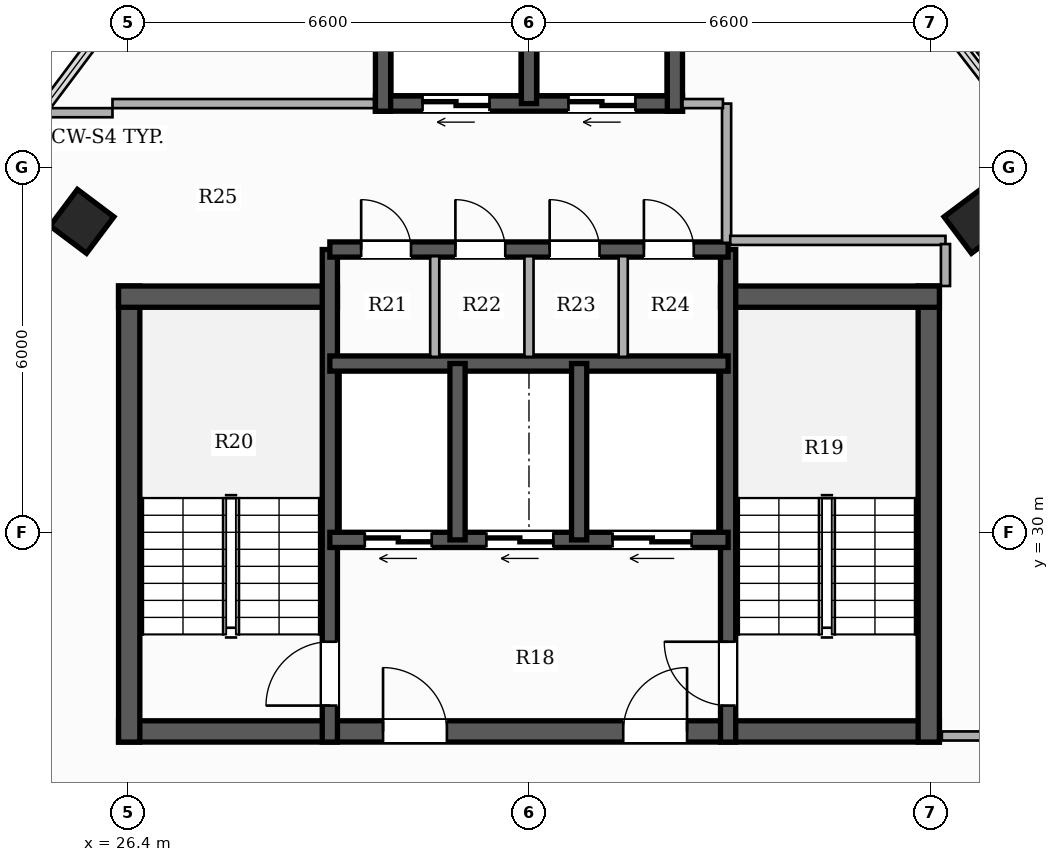
"""IFC4 building model, lengths in metres.
Left out: names, types, materials, properties, quantities, classifications, styles, units other than length and angle.
Written with IfcOpenShell. Run it as: python <this file> out.ifc"""

import sys

from ifc_helpers import new_model, si_unit, direction, frame, frame_2d, origin, origin_2d, place, context, subcontext, project, spatial, rectangle, hollow_rectangle, extrude, element, fill, save


model = new_model("IFC4")
c1 = context("Model", 3, precision=1e-05, world=origin(), true_north=direction((0.0, 1.0)))
c2 = subcontext(c1, "Body", "Model", "MODEL_VIEW")
j1 = project(units=[si_unit("LENGTHUNIT", "METRE"), si_unit("PLANEANGLEUNIT", "RADIAN")], contexts=[c1])
p1 = place(None, origin())
s1 = spatial("IfcSite", under=j1, at=p1, CompositionType="ELEMENT")
p2 = place(p1, origin())
s2 = spatial("IfcBuilding", under=s1, at=p2, CompositionType="ELEMENT")
p3 = place(p2, frame((0.0, 0.0, 243.65)))
s3 = spatial("IfcBuildingStorey", under=s2, at=p3, CompositionType="ELEMENT", Elevation=243.65)
p4 = place(p3, frame((26.25, 26.725, 0.0), z_axis=(0.0, 0.0, 1.0), x_axis=(1.0, 0.0, 0.0)))
e1 = element("IfcWall", 1, at=p4, inside=s3, PredefinedType="SHEAR", context=c2, shape_type="SweptSolid", body=[
    extrude(rectangle(XDim=13.5, YDim=0.35, at=frame_2d((6.75, 0.0))), origin(), (0.0, 0.0, 1.0), 3.3),
])
p5 = place(p4, frame((4.35, 0.0, 0.0)))
e2 = element("IfcOpeningElement", 2, at=p5, cuts=e1, PredefinedType="OPENING", context=c2, shape_type="SweptSolid", body=[
    extrude(rectangle(XDim=1.05, YDim=2.15, at=frame_2d((0.525, 1.075))), frame((0.0, 0.185, 0.0), z_axis=(0.0, -1.0, 0.0), x_axis=(1.0, 0.0, 0.0)), (0.0, 0.0, 1.0), 0.37),
])
p6 = place(p4, frame((8.3, 0.0, 0.0)))
e3 = element("IfcOpeningElement", 3, at=p6, cuts=e1, PredefinedType="OPENING", context=c2, shape_type="SweptSolid", body=[
    extrude(rectangle(XDim=1.05, YDim=2.15, at=frame_2d((0.525, 1.075))), frame((0.0, 0.185, 0.0), z_axis=(0.0, -1.0, 0.0), x_axis=(1.0, 0.0, 0.0)), (0.0, 0.0, 1.0), 0.37),
])
p7 = place(p3, frame((26.425, 26.55, 0.0), z_axis=(0.0, 0.0, 1.0), x_axis=(0.0, 1.0, 0.0)))
e4 = element("IfcWall", 4, at=p7, inside=s3, PredefinedType="SHEAR", context=c2, shape_type="SweptSolid", body=[
    extrude(rectangle(XDim=7.5, YDim=0.35, at=frame_2d((3.75, 0.0))), origin(), (0.0, 0.0, 1.0), 3.3),
])
p8 = place(p3, frame((26.25, 33.875, 0.0), z_axis=(0.0, 0.0, 1.0), x_axis=(1.0, 0.0, 0.0)))
e5 = element("IfcWall", 5, at=p8, inside=s3, PredefinedType="SHEAR", context=c2, shape_type="SweptSolid", body=[
    extrude(rectangle(XDim=3.6, YDim=0.35, at=frame_2d((1.8, 0.0))), origin(), (0.0, 0.0, 1.0), 3.3),
])
p9 = place(p3, frame((39.575, 26.55, 0.0), z_axis=(0.0, 0.0, 1.0), x_axis=(0.0, 1.0, 0.0)))
e6 = element("IfcWall", 6, at=p9, inside=s3, PredefinedType="SHEAR", context=c2, shape_type="SweptSolid", body=[
    extrude(rectangle(XDim=7.5, YDim=0.35, at=frame_2d((3.75, 0.0))), origin(), (0.0, 0.0, 1.0), 3.3),
])
p10 = place(p3, frame((36.15, 33.875, 0.0), z_axis=(0.0, 0.0, 1.0), x_axis=(1.0, 0.0, 0.0)))
e7 = element("IfcWall", 7, at=p10, inside=s3, PredefinedType="SHEAR", context=c2, shape_type="SweptSolid", body=[
    extrude(rectangle(XDim=3.6, YDim=0.35, at=frame_2d((1.8, 0.0))), origin(), (0.0, 0.0, 1.0), 3.3),
])
p11 = place(p3, frame((29.725, 26.55, 0.0), z_axis=(0.0, 0.0, 1.0), x_axis=(0.0, 1.0, 0.0)))
e8 = element("IfcWall", 8, at=p11, inside=s3, PredefinedType="SHEAR", context=c2, shape_type="SweptSolid", body=[
    extrude(rectangle(XDim=8.1, YDim=0.25, at=frame_2d((4.05, 0.0))), origin(), (0.0, 0.0, 1.0), 3.3),
])
p12 = place(p11, frame((0.6, 0.0, 0.0)))
e9 = element("IfcOpeningElement", 9, at=p12, cuts=e8, PredefinedType="OPENING", context=c2, shape_type="SweptSolid", body=[
    extrude(rectangle(XDim=1.05, YDim=2.15, at=frame_2d((0.525, 1.075))), frame((0.0, 0.135, 0.0), z_axis=(0.0, -1.0, 0.0), x_axis=(1.0, 0.0, 0.0)), (0.0, 0.0, 1.0), 0.27),
])
p13 = place(p3, frame((36.275, 26.55, 0.0), z_axis=(0.0, 0.0, 1.0), x_axis=(0.0, 1.0, 0.0)))
e10 = element("IfcWall", 10, at=p13, inside=s3, PredefinedType="SHEAR", context=c2, shape_type="SweptSolid", body=[
    extrude(rectangle(XDim=8.1, YDim=0.25, at=frame_2d((4.05, 0.0))), origin(), (0.0, 0.0, 1.0), 3.3),
])
p14 = place(p13, frame((0.6, 0.0, 0.0)))
e11 = element("IfcOpeningElement", 11, at=p14, cuts=e10, PredefinedType="OPENING", context=c2, shape_type="SweptSolid", body=[
    extrude(rectangle(XDim=1.05, YDim=2.15, at=frame_2d((0.525, 1.075))), frame((0.0, 0.135, 0.0), z_axis=(0.0, -1.0, 0.0), x_axis=(1.0, 0.0, 0.0)), (0.0, 0.0, 1.0), 0.27),
])
p15 = place(p3, frame((36.275, 29.875, 0.0), z_axis=(0.0, 0.0, 1.0), x_axis=(-1.0, 0.0, 0.0)))
e12 = element("IfcWall", 12, at=p15, inside=s3, PredefinedType="SHEAR", context=c2, shape_type="SweptSolid", body=[
    extrude(rectangle(XDim=6.55, YDim=0.25, at=frame_2d((3.275, 0.0))), origin(), (0.0, 0.0, 1.0), 3.3),
])
p16 = place(p15, frame((4.875, 0.0, 0.0)))
e13 = element("IfcOpeningElement", 13, at=p16, cuts=e12, PredefinedType="OPENING", context=c2, shape_type="SweptSolid", body=[
    extrude(rectangle(XDim=1.1, YDim=2.2, at=frame_2d((0.55, 1.1))), frame((0.0, 0.135, 0.0), z_axis=(0.0, -1.0, 0.0), x_axis=(1.0, 0.0, 0.0)), (0.0, 0.0, 1.0), 0.27),
])
p17 = place(p15, frame((2.875, 0.0, 0.0)))
e14 = element("IfcOpeningElement", 14, at=p17, cuts=e12, PredefinedType="OPENING", context=c2, shape_type="SweptSolid", body=[
    extrude(rectangle(XDim=1.1, YDim=2.2, at=frame_2d((0.55, 1.1))), frame((0.0, 0.135, 0.0), z_axis=(0.0, -1.0, 0.0), x_axis=(1.0, 0.0, 0.0)), (0.0, 0.0, 1.0), 0.27),
])
p18 = place(p15, frame((0.6, 0.0, 0.0)))
e15 = element("IfcOpeningElement", 15, at=p18, cuts=e12, PredefinedType="OPENING", context=c2, shape_type="SweptSolid", body=[
    extrude(rectangle(XDim=1.3, YDim=2.2, at=frame_2d((0.65, 1.1))), frame((0.0, 0.135, 0.0), z_axis=(0.0, -1.0, 0.0), x_axis=(1.0, 0.0, 0.0)), (0.0, 0.0, 1.0), 0.27),
])
p19 = place(p3, frame((29.725, 32.775, 0.0), z_axis=(0.0, 0.0, 1.0), x_axis=(1.0, 0.0, 0.0)))
e16 = element("IfcWall", 16, at=p19, inside=s3, PredefinedType="SHEAR", context=c2, shape_type="SweptSolid", body=[
    extrude(rectangle(XDim=6.55, YDim=0.25, at=frame_2d((3.275, 0.0))), origin(), (0.0, 0.0, 1.0), 3.3),
])
for number, where, z_axis, x_axis in (
    (17, (31.825, 29.875, 0.0), (0.0, 0.0, 1.0), (0.0, 1.0, 0.0)),
    (18, (33.825, 29.875, 0.0), (0.0, 0.0, 1.0), (0.0, 1.0, 0.0)),
):
    element("IfcWall", number, at=place(p3, frame(where, z_axis=z_axis, x_axis=x_axis)), inside=s3, PredefinedType="SHEAR", context=c2, shape_type="SweptSolid", body=[
        extrude(rectangle(XDim=2.9, YDim=0.25, at=frame_2d((1.45, 0.0))), origin(), (0.0, 0.0, 1.0), 3.3),
    ])
p20 = place(p3, frame((29.725, 34.65, 0.0), z_axis=(0.0, 0.0, 1.0), x_axis=(1.0, 0.0, 0.0)))
e19 = element("IfcWall", 19, at=p20, inside=s3, PredefinedType="SHEAR", context=c2, shape_type="SweptSolid", body=[
    extrude(rectangle(XDim=6.55, YDim=0.25, at=frame_2d((3.275, 0.0))), origin(), (0.0, 0.0, 1.0), 3.3),
])
p21 = place(p20, frame((0.515, 0.0, 0.0)))
e20 = element("IfcOpeningElement", 20, at=p21, cuts=e19, PredefinedType="OPENING", context=c2, shape_type="SweptSolid", body=[
    extrude(rectangle(XDim=0.82, YDim=2.1, at=frame_2d((0.41, 1.05))), frame((0.0, 0.135, 0.0), z_axis=(0.0, -1.0, 0.0), x_axis=(1.0, 0.0, 0.0)), (0.0, 0.0, 1.0), 0.27),
])
p22 = place(p20, frame((2.065, 0.0, 0.0)))
e21 = element("IfcOpeningElement", 21, at=p22, cuts=e19, PredefinedType="OPENING", context=c2, shape_type="SweptSolid", body=[
    extrude(rectangle(XDim=0.82, YDim=2.1, at=frame_2d((0.41, 1.05))), frame((0.0, 0.135, 0.0), z_axis=(0.0, -1.0, 0.0), x_axis=(1.0, 0.0, 0.0)), (0.0, 0.0, 1.0), 0.27),
])
p23 = place(p20, frame((3.615, 0.0, 0.0)))
e22 = element("IfcOpeningElement", 22, at=p23, cuts=e19, PredefinedType="OPENING", context=c2, shape_type="SweptSolid", body=[
    extrude(rectangle(XDim=0.82, YDim=2.1, at=frame_2d((0.41, 1.05))), frame((0.0, 0.135, 0.0), z_axis=(0.0, -1.0, 0.0), x_axis=(1.0, 0.0, 0.0)), (0.0, 0.0, 1.0), 0.27),
])
p24 = place(p20, frame((5.165, 0.0, 0.0)))
e23 = element("IfcOpeningElement", 23, at=p24, cuts=e19, PredefinedType="OPENING", context=c2, shape_type="SweptSolid", body=[
    extrude(rectangle(XDim=0.82, YDim=2.1, at=frame_2d((0.41, 1.05))), frame((0.0, 0.135, 0.0), z_axis=(0.0, -1.0, 0.0), x_axis=(1.0, 0.0, 0.0)), (0.0, 0.0, 1.0), 0.27),
])
p25 = place(p3, frame((35.525, 37.05, 0.0), z_axis=(0.0, 0.0, 1.0), x_axis=(-1.0, 0.0, 0.0)))
e24 = element("IfcWall", 24, at=p25, inside=s3, PredefinedType="SHEAR", context=c2, shape_type="SweptSolid", body=[
    extrude(rectangle(XDim=5.05, YDim=0.25, at=frame_2d((2.525, 0.0))), origin(), (0.0, 0.0, 1.0), 3.3),
])
p26 = place(p25, frame((3.175, 0.0, 0.0)))
e25 = element("IfcOpeningElement", 25, at=p26, cuts=e24, PredefinedType="OPENING", context=c2, shape_type="SweptSolid", body=[
    extrude(rectangle(XDim=1.1, YDim=2.2, at=frame_2d((0.55, 1.1))), frame((0.0, 0.135, 0.0), z_axis=(0.0, -1.0, 0.0), x_axis=(1.0, 0.0, 0.0)), (0.0, 0.0, 1.0), 0.27),
])
p27 = place(p25, frame((0.775, 0.0, 0.0)))
e26 = element("IfcOpeningElement", 26, at=p27, cuts=e24, PredefinedType="OPENING", context=c2, shape_type="SweptSolid", body=[
    extrude(rectangle(XDim=1.1, YDim=2.2, at=frame_2d((0.55, 1.1))), frame((0.0, 0.135, 0.0), z_axis=(0.0, -1.0, 0.0), x_axis=(1.0, 0.0, 0.0)), (0.0, 0.0, 1.0), 0.27),
])
for number, where, z_axis, x_axis in (
    (27, (30.6, 36.925, 0.0), (0.0, 0.0, 1.0), (0.0, 1.0, 0.0)),
    (28, (35.4, 36.925, 0.0), (0.0, 0.0, 1.0), (0.0, 1.0, 0.0)),
):
    element("IfcWall", number, at=place(p3, frame(where, z_axis=z_axis, x_axis=x_axis)), inside=s3, PredefinedType="SHEAR", context=c2, shape_type="SweptSolid", body=[
        extrude(rectangle(XDim=2.8, YDim=0.25, at=frame_2d((1.4, 0.0))), origin(), (0.0, 0.0, 1.0), 3.3),
    ])
p28 = place(p3, frame((33.0, 37.05, 0.0), z_axis=(0.0, 0.0, 1.0), x_axis=(0.0, 1.0, 0.0)))
e29 = element("IfcWall", 29, at=p28, inside=s3, PredefinedType="SHEAR", context=c2, shape_type="SweptSolid", body=[
    extrude(rectangle(XDim=2.55, YDim=0.25, at=frame_2d((1.275, 0.0))), origin(), (0.0, 0.0, 1.0), 3.3),
])
for number, where, z_axis, x_axis in (
    (30, (25.648, 35.113, 0.0), (0.0, 0.0, 1.0), (0.6, 0.8, 0.0)),
    (31, (40.352, 35.113, 0.0), (0.0, 0.0, 1.0), (-0.6, 0.8, 0.0)),
):
    element("IfcColumn", number, at=place(p3, frame(where, z_axis=z_axis, x_axis=x_axis)), inside=s3, PredefinedType="COLUMN", context=c2, shape_type="SweptSolid", body=[
        extrude(hollow_rectangle(XDim=0.75, YDim=0.75, WallThickness=0.025, at=origin_2d()), origin(), (0.0, 0.0, 1.0), 3.3),
    ])
p29 = place(p3, frame((36.25, 34.76, 0.0), z_axis=(0.0, 0.0, 1.0), x_axis=(0.0, 1.0, 0.0)))
e32 = element("IfcWall", 32, at=p29, inside=s3, PredefinedType="PARTITIONING", context=c2, shape_type="SweptSolid", body=[
    extrude(rectangle(XDim=2.29, YDim=0.15, at=frame_2d((1.145, 0.0))), origin(), (0.0, 0.0, 1.0), 2.425),
])
p30 = place(p3, frame((35.525, 37.05, 0.0), z_axis=(0.0, 0.0, 1.0), x_axis=(1.0, 0.0, 0.0)))
e33 = element("IfcWall", 33, at=p30, inside=s3, PredefinedType="PARTITIONING", context=c2, shape_type="SweptSolid", body=[
    extrude(rectangle(XDim=0.665, YDim=0.15, at=frame_2d((0.333, 0.0))), origin(), (0.0, 0.0, 1.0), 2.425),
])
for number, where, z_axis, x_axis in (
    (34, (31.45, 32.885, 0.0), (0.0, 0.0, 1.0), (0.0, 1.0, 0.0)),
    (35, (33.0, 32.885, 0.0), (0.0, 0.0, 1.0), (0.0, 1.0, 0.0)),
    (36, (34.55, 32.885, 0.0), (0.0, 0.0, 1.0), (0.0, 1.0, 0.0)),
):
    element("IfcWall", number, at=place(p3, frame(where, z_axis=z_axis, x_axis=x_axis)), inside=s3, PredefinedType="PARTITIONING", context=c2, shape_type="SweptSolid", body=[
        extrude(rectangle(XDim=1.655, YDim=0.15, at=frame_2d((0.828, 0.0))), origin(), (0.0, 0.0, 1.0), 3.06),
    ])
p31 = place(p3, frame((24.846, 36.9, 0.0), z_axis=(0.0, 0.0, 1.0), x_axis=(1.0, 0.0, 0.0)))
e37 = element("IfcWall", 37, at=p31, inside=s3, PredefinedType="PARTITIONING", context=c2, shape_type="SweptSolid", body=[
    extrude(rectangle(XDim=1.304, YDim=0.15, at=frame_2d((0.652, 0.0))), origin(), (0.0, 0.0, 1.0), 2.619),
])
p32 = place(p3, frame((39.79, 26.65, 0.0), z_axis=(0.0, 0.0, 1.0), x_axis=(1.0, 0.0, 0.0)))
e38 = element("IfcWall", 38, at=p32, inside=s3, PredefinedType="PARTITIONING", context=c2, shape_type="SweptSolid", body=[
    extrude(rectangle(XDim=2.46, YDim=0.15, at=frame_2d((1.23, 0.0))), origin(), (0.0, 0.0, 1.0), 2.565),
])
p33 = place(p3, frame((26.15, 37.05, 0.0), z_axis=(0.0, 0.0, 1.0), x_axis=(1.0, 0.0, 0.0)))
e39 = element("IfcWall", 39, at=p33, inside=s3, PredefinedType="PARTITIONING", context=c2, shape_type="SweptSolid", body=[
    extrude(rectangle(XDim=4.3, YDim=0.15, at=frame_2d((2.15, 0.0))), origin(), (0.0, 0.0, 1.0), 2.425),
])
p34 = place(p3, frame((36.31, 34.8, 0.0), z_axis=(0.0, 0.0, 1.0), x_axis=(1.0, 0.0, 0.0)))
e40 = element("IfcWall", 40, at=p34, inside=s3, PredefinedType="PARTITIONING", context=c2, shape_type="SweptSolid", body=[
    extrude(rectangle(XDim=3.54, YDim=0.15, at=frame_2d((1.77, 0.0))), origin(), (0.0, 0.0, 1.0), 2.425),
])
p35 = place(p3, frame((39.85, 34.74, 0.0), z_axis=(0.0, 0.0, 1.0), x_axis=(0.0, -1.0, 0.0)))
e41 = element("IfcWall", 41, at=p35, inside=s3, PredefinedType="PARTITIONING", context=c2, shape_type="SweptSolid", body=[
    extrude(rectangle(XDim=0.69, YDim=0.15, at=frame_2d((0.345, 0.0))), origin(), (0.0, 0.0, 1.0), 2.773),
])
p36 = place(p12, origin())
e42 = element("IfcDoor", 42, at=p36, inside=s3, OperationType="SINGLE_SWING_LEFT", PredefinedType="DOOR", context=c2, shape_type="SweptSolid", body=[
    extrude(rectangle(XDim=1.05, YDim=2.15, at=frame_2d((0.525, 1.075))), frame((0.0, 0.025, 0.0), z_axis=(0.0, -1.0, 0.0), x_axis=(1.0, 0.0, 0.0)), (0.0, 0.0, 1.0), 0.05),
])
fill(e9, e42)
p37 = place(p14, origin())
e43 = element("IfcDoor", 43, at=p37, inside=s3, OperationType="SINGLE_SWING_RIGHT", PredefinedType="DOOR", context=c2, shape_type="SweptSolid", body=[
    extrude(rectangle(XDim=1.05, YDim=2.15, at=frame_2d((0.525, 1.075))), frame((0.0, 0.025, 0.0), z_axis=(0.0, -1.0, 0.0), x_axis=(1.0, 0.0, 0.0)), (0.0, 0.0, 1.0), 0.05),
])
fill(e11, e43)
p38 = place(p5, origin())
e44 = element("IfcDoor", 44, at=p38, inside=s3, OperationType="SINGLE_SWING_LEFT", PredefinedType="DOOR", context=c2, shape_type="SweptSolid", body=[
    extrude(rectangle(XDim=1.05, YDim=2.15, at=frame_2d((0.525, 1.075))), frame((0.0, 0.025, 0.0), z_axis=(0.0, -1.0, 0.0), x_axis=(1.0, 0.0, 0.0)), (0.0, 0.0, 1.0), 0.05),
])
fill(e2, e44)
p39 = place(p6, origin())
e45 = element("IfcDoor", 45, at=p39, inside=s3, OperationType="SINGLE_SWING_RIGHT", PredefinedType="DOOR", context=c2, shape_type="SweptSolid", body=[
    extrude(rectangle(XDim=1.05, YDim=2.15, at=frame_2d((0.525, 1.075))), frame((0.0, 0.025, 0.0), z_axis=(0.0, -1.0, 0.0), x_axis=(1.0, 0.0, 0.0)), (0.0, 0.0, 1.0), 0.05),
])
fill(e3, e45)
p40 = place(p16, origin())
e46 = element("IfcDoor", 46, at=p40, inside=s3, OperationType="DOUBLE_DOOR_SLIDING", PredefinedType="DOOR", context=c2, shape_type="SweptSolid", body=[
    extrude(rectangle(XDim=1.1, YDim=2.2, at=frame_2d((0.55, 1.1))), frame((0.0, 0.025, 0.0), z_axis=(0.0, -1.0, 0.0), x_axis=(1.0, 0.0, 0.0)), (0.0, 0.0, 1.0), 0.05),
])
fill(e13, e46)
p41 = place(p17, origin())
e47 = element("IfcDoor", 47, at=p41, inside=s3, OperationType="DOUBLE_DOOR_SLIDING", PredefinedType="DOOR", context=c2, shape_type="SweptSolid", body=[
    extrude(rectangle(XDim=1.1, YDim=2.2, at=frame_2d((0.55, 1.1))), frame((0.0, 0.025, 0.0), z_axis=(0.0, -1.0, 0.0), x_axis=(1.0, 0.0, 0.0)), (0.0, 0.0, 1.0), 0.05),
])
fill(e14, e47)
p42 = place(p18, origin())
e48 = element("IfcDoor", 48, at=p42, inside=s3, OperationType="DOUBLE_DOOR_SLIDING", PredefinedType="DOOR", context=c2, shape_type="SweptSolid", body=[
    extrude(rectangle(XDim=1.3, YDim=2.2, at=frame_2d((0.65, 1.1))), frame((0.0, 0.025, 0.0), z_axis=(0.0, -1.0, 0.0), x_axis=(1.0, 0.0, 0.0)), (0.0, 0.0, 1.0), 0.05),
])
fill(e15, e48)
p43 = place(p26, origin())
e49 = element("IfcDoor", 49, at=p43, inside=s3, OperationType="DOUBLE_DOOR_SLIDING", PredefinedType="DOOR", context=c2, shape_type="SweptSolid", body=[
    extrude(rectangle(XDim=1.1, YDim=2.2, at=frame_2d((0.55, 1.1))), frame((0.0, 0.025, 0.0), z_axis=(0.0, -1.0, 0.0), x_axis=(1.0, 0.0, 0.0)), (0.0, 0.0, 1.0), 0.05),
])
fill(e25, e49)
p44 = place(p27, origin())
e50 = element("IfcDoor", 50, at=p44, inside=s3, OperationType="DOUBLE_DOOR_SLIDING", PredefinedType="DOOR", context=c2, shape_type="SweptSolid", body=[
    extrude(rectangle(XDim=1.1, YDim=2.2, at=frame_2d((0.55, 1.1))), frame((0.0, 0.025, 0.0), z_axis=(0.0, -1.0, 0.0), x_axis=(1.0, 0.0, 0.0)), (0.0, 0.0, 1.0), 0.05),
])
fill(e26, e50)
p45 = place(p21, origin())
e51 = element("IfcDoor", 51, at=p45, inside=s3, OperationType="SINGLE_SWING_LEFT", PredefinedType="DOOR", context=c2, shape_type="SweptSolid", body=[
    extrude(rectangle(XDim=0.82, YDim=2.1, at=frame_2d((0.41, 1.05))), frame((0.0, 0.025, 0.0), z_axis=(0.0, -1.0, 0.0), x_axis=(1.0, 0.0, 0.0)), (0.0, 0.0, 1.0), 0.05),
])
fill(e20, e51)
p46 = place(p22, origin())
e52 = element("IfcDoor", 52, at=p46, inside=s3, OperationType="SINGLE_SWING_LEFT", PredefinedType="DOOR", context=c2, shape_type="SweptSolid", body=[
    extrude(rectangle(XDim=0.82, YDim=2.1, at=frame_2d((0.41, 1.05))), frame((0.0, 0.025, 0.0), z_axis=(0.0, -1.0, 0.0), x_axis=(1.0, 0.0, 0.0)), (0.0, 0.0, 1.0), 0.05),
])
fill(e21, e52)
p47 = place(p23, origin())
e53 = element("IfcDoor", 53, at=p47, inside=s3, OperationType="SINGLE_SWING_LEFT", PredefinedType="DOOR", context=c2, shape_type="SweptSolid", body=[
    extrude(rectangle(XDim=0.82, YDim=2.1, at=frame_2d((0.41, 1.05))), frame((0.0, 0.025, 0.0), z_axis=(0.0, -1.0, 0.0), x_axis=(1.0, 0.0, 0.0)), (0.0, 0.0, 1.0), 0.05),
])
fill(e22, e53)
p48 = place(p24, origin())
e54 = element("IfcDoor", 54, at=p48, inside=s3, OperationType="SINGLE_SWING_LEFT", PredefinedType="DOOR", context=c2, shape_type="SweptSolid", body=[
    extrude(rectangle(XDim=0.82, YDim=2.1, at=frame_2d((0.41, 1.05))), frame((0.0, 0.025, 0.0), z_axis=(0.0, -1.0, 0.0), x_axis=(1.0, 0.0, 0.0)), (0.0, 0.0, 1.0), 0.05),
])
fill(e23, e54)
save(model, sys.argv[1])
